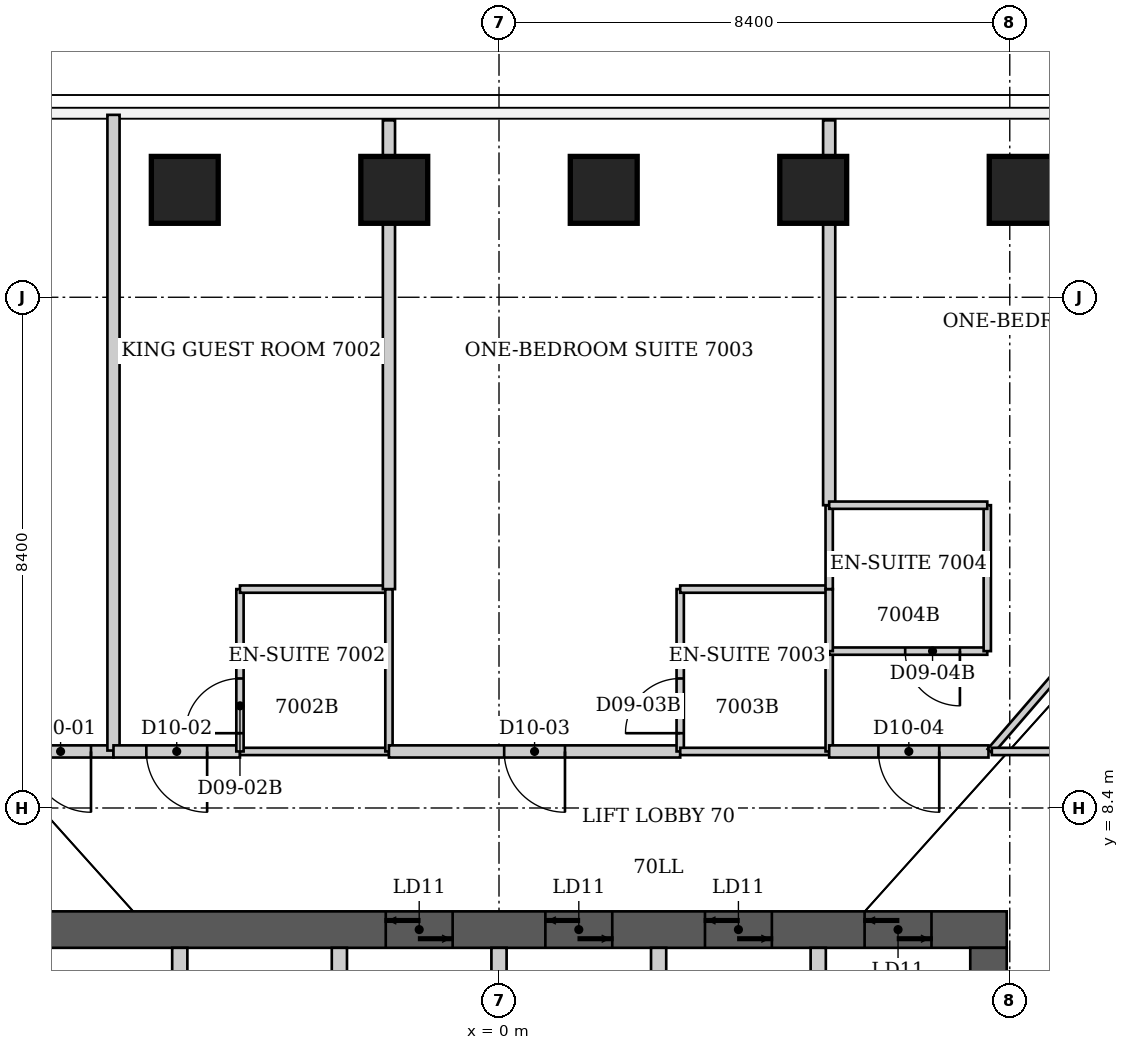
"""IFC4 building model, lengths in metres.
Left out: names, types, materials, properties, quantities, classifications, styles, units other than length and angle.
Written with IfcOpenShell. Run it as: python <this file> out.ifc"""

import sys

from ifc_helpers import new_model, si_unit, direction, frame, frame_2d, origin, origin_2d, place, context, subcontext, project, spatial, rectangle, extrude, element, fill, save


model = new_model("IFC4")
c1 = context("Model", 3, precision=1e-05, world=origin(), true_north=direction((0.0, 1.0)))
c2 = subcontext(c1, "Body", "Model", "MODEL_VIEW")
j1 = project(units=[si_unit("LENGTHUNIT", "METRE"), si_unit("PLANEANGLEUNIT", "RADIAN")], contexts=[c1])
p1 = place(None, origin())
s1 = spatial("IfcSite", under=j1, at=p1, CompositionType="ELEMENT")
p2 = place(p1, origin())
s2 = spatial("IfcBuilding", under=s1, at=p2, CompositionType="ELEMENT")
p3 = place(p2, frame((0.0, 0.0, 279.8)))
s3 = spatial("IfcBuildingStorey", under=s2, at=p3, CompositionType="ELEMENT", Elevation=279.8)
for number, where, z_axis, x_axis in (
    (1, (-5.167, 18.566, 0.0), (0.0, 0.0, 1.0), (0.0, 1.0, 0.0)),
    (2, (-1.722, 18.566, 0.0), (0.0, 0.0, 1.0), (0.0, 1.0, 0.0)),
    (3, (1.722, 18.566, 0.0), (0.0, 0.0, 1.0), (0.0, 1.0, 0.0)),
    (4, (5.167, 18.566, 0.0), (0.0, 0.0, 1.0), (0.0, 1.0, 0.0)),
    (5, (8.613, 18.566, 0.0), (0.0, 0.0, 1.0), (0.0, 1.0, 0.0)),
):
    element("IfcColumn", number, at=place(p3, frame(where, z_axis=z_axis, x_axis=x_axis)), inside=s3, PredefinedType="COLUMN", context=c2, shape_type="SweptSolid", body=[
        extrude(rectangle(XDim=1.1, YDim=1.1, at=origin_2d()), origin(), (0.0, 0.0, 1.0), 3.8),
    ])
p4 = place(p3, frame((-8.35, 6.4, 0.0), z_axis=(0.0, 0.0, 1.0), x_axis=(1.0, 0.0, 0.0)))
e6 = element("IfcWall", 6, at=p4, inside=s3, PredefinedType="SHEAR", context=c2, shape_type="SweptSolid", body=[
    extrude(rectangle(XDim=16.7, YDim=0.6, at=frame_2d((8.35, 0.0))), origin(), (0.0, 0.0, 1.0), 3.8),
])
p5 = place(p4, frame((6.488, 0.0, 0.0)))
e7 = element("IfcOpeningElement", 7, at=p5, cuts=e6, PredefinedType="OPENING", context=c2, shape_type="SweptSolid", body=[
    extrude(rectangle(XDim=1.1, YDim=2.1, at=frame_2d((0.55, 1.05))), frame((0.0, 0.3, 0.0), z_axis=(0.0, -1.0, 0.0), x_axis=(1.0, 0.0, 0.0)), (0.0, 0.0, 1.0), 0.6),
])
p6 = place(p4, frame((9.113, 0.0, 0.0)))
e8 = element("IfcOpeningElement", 8, at=p6, cuts=e6, PredefinedType="OPENING", context=c2, shape_type="SweptSolid", body=[
    extrude(rectangle(XDim=1.1, YDim=2.1, at=frame_2d((0.55, 1.05))), frame((0.0, 0.3, 0.0), z_axis=(0.0, -1.0, 0.0), x_axis=(1.0, 0.0, 0.0)), (0.0, 0.0, 1.0), 0.6),
])
p7 = place(p4, frame((11.738, 0.0, 0.0)))
e9 = element("IfcOpeningElement", 9, at=p7, cuts=e6, PredefinedType="OPENING", context=c2, shape_type="SweptSolid", body=[
    extrude(rectangle(XDim=1.1, YDim=2.1, at=frame_2d((0.55, 1.05))), frame((0.0, 0.3, 0.0), z_axis=(0.0, -1.0, 0.0), x_axis=(1.0, 0.0, 0.0)), (0.0, 0.0, 1.0), 0.6),
])
p8 = place(p4, frame((14.363, 0.0, 0.0)))
e10 = element("IfcOpeningElement", 10, at=p8, cuts=e6, PredefinedType="OPENING", context=c2, shape_type="SweptSolid", body=[
    extrude(rectangle(XDim=1.1, YDim=2.1, at=frame_2d((0.55, 1.05))), frame((0.0, 0.3, 0.0), z_axis=(0.0, -1.0, 0.0), x_axis=(1.0, 0.0, 0.0)), (0.0, 0.0, 1.0), 0.6),
])
p9 = place(p3, frame((8.05, -6.1, 0.0), z_axis=(0.0, 0.0, 1.0), x_axis=(0.0, 1.0, 0.0)))
e11 = element("IfcWall", 11, at=p9, inside=s3, PredefinedType="SHEAR", context=c2, shape_type="SweptSolid", body=[
    extrude(rectangle(XDim=12.2, YDim=0.6, at=frame_2d((6.1, 0.0))), origin(), (0.0, 0.0, 1.0), 3.8),
])
p10 = place(p9, frame((7.6, 0.0, 0.0)))
e12 = element("IfcOpeningElement", 12, at=p10, cuts=e11, PredefinedType="OPENING", context=c2, shape_type="SweptSolid", body=[
    extrude(rectangle(XDim=1.2, YDim=2.2, at=frame_2d((0.6, 1.1))), frame((0.0, 0.3, 0.0), z_axis=(0.0, -1.0, 0.0), x_axis=(1.0, 0.0, 0.0)), (0.0, 0.0, 1.0), 0.6),
])
for number, where, z_axis, x_axis in (
    (13, (-5.25, 3.35, 0.0), (0.0, 0.0, 1.0), (0.0, 1.0, 0.0)),
    (14, (-2.625, 3.35, 0.0), (0.0, 0.0, 1.0), (0.0, 1.0, 0.0)),
    (15, (0.0, 3.35, 0.0), (0.0, 0.0, 1.0), (0.0, 1.0, 0.0)),
    (16, (2.625, 3.35, 0.0), (0.0, 0.0, 1.0), (0.0, 1.0, 0.0)),
    (17, (5.25, 3.35, 0.0), (0.0, 0.0, 1.0), (0.0, 1.0, 0.0)),
):
    element("IfcWall", number, at=place(p3, frame(where, z_axis=z_axis, x_axis=x_axis)), inside=s3, PredefinedType="PARTITIONING", context=c2, shape_type="SweptSolid", body=[
        extrude(rectangle(XDim=2.75, YDim=0.25, at=frame_2d((1.375, 0.0))), origin(), (0.0, 0.0, 1.0), 3.8),
    ])
p11 = place(p3, frame((-6.34, 9.33, 0.0), z_axis=(0.0, 0.0, 1.0), x_axis=(-1.0, 0.0, 0.0)))
e18 = element("IfcWall", 18, at=p11, inside=s3, PredefinedType="PARTITIONING", context=c2, shape_type="SweptSolid", body=[
    extrude(rectangle(XDim=1.74, YDim=0.2, at=frame_2d((0.87, 0.0))), origin(), (0.0, 0.0, 1.0), 3.64),
])
p12 = place(p11, frame((0.37, 0.0, 0.0)))
e19 = element("IfcOpeningElement", 19, at=p12, cuts=e18, PredefinedType="OPENING", context=c2, shape_type="SweptSolid", body=[
    extrude(rectangle(XDim=1.0, YDim=2.13, at=frame_2d((0.5, 1.065))), frame((0.0, 0.1, 0.0), z_axis=(0.0, -1.0, 0.0), x_axis=(1.0, 0.0, 0.0)), (0.0, 0.0, 1.0), 0.2),
])
p13 = place(p3, frame((-6.34, 19.8, 0.0), z_axis=(0.0, 0.0, 1.0), x_axis=(0.0, -1.0, 0.0)))
e20 = element("IfcWall", 20, at=p13, inside=s3, PredefinedType="PARTITIONING", context=c2, shape_type="SweptSolid", body=[
    extrude(rectangle(XDim=10.455, YDim=0.2, at=frame_2d((5.228, 0.0))), origin(), (0.0, 0.0, 1.0), 3.64),
])
p14 = place(p3, frame((-4.26, 9.33, 0.0), z_axis=(0.0, 0.0, 1.0), x_axis=(-1.0, 0.0, 0.0)))
e21 = element("IfcWall", 21, at=p14, inside=s3, PredefinedType="PARTITIONING", context=c2, shape_type="SweptSolid", body=[
    extrude(rectangle(XDim=2.08, YDim=0.2, at=frame_2d((1.04, 0.0))), origin(), (0.0, 0.0, 1.0), 3.64),
])
p15 = place(p14, frame((0.54, 0.0, 0.0)))
e22 = element("IfcOpeningElement", 22, at=p15, cuts=e21, PredefinedType="OPENING", context=c2, shape_type="SweptSolid", body=[
    extrude(rectangle(XDim=1.0, YDim=2.13, at=frame_2d((0.5, 1.065))), frame((0.0, 0.1, 0.0), z_axis=(0.0, -1.0, 0.0), x_axis=(1.0, 0.0, 0.0)), (0.0, 0.0, 1.0), 0.2),
])
p16 = place(p3, frame((-4.26, 9.33, 0.0), z_axis=(0.0, 0.0, 1.0), x_axis=(1.0, 0.0, 0.0)))
e23 = element("IfcWall", 23, at=p16, inside=s3, PredefinedType="PARTITIONING", context=c2, shape_type="SweptSolid", body=[
    extrude(rectangle(XDim=2.45, YDim=0.12, at=frame_2d((1.225, 0.0))), origin(), (0.0, 0.0, 1.0), 3.64),
])
p17 = place(p3, frame((-4.26, 12.0, 0.0), z_axis=(0.0, 0.0, 1.0), x_axis=(0.0, -1.0, 0.0)))
e24 = element("IfcWall", 24, at=p17, inside=s3, PredefinedType="PARTITIONING", context=c2, shape_type="SweptSolid", body=[
    extrude(rectangle(XDim=2.67, YDim=0.12, at=frame_2d((1.335, 0.0))), origin(), (0.0, 0.0, 1.0), 3.64),
])
p18 = place(p17, frame((1.47, 0.0, 0.0)))
e25 = element("IfcOpeningElement", 25, at=p18, cuts=e24, PredefinedType="OPENING", context=c2, shape_type="SweptSolid", body=[
    extrude(rectangle(XDim=0.9, YDim=2.03, at=frame_2d((0.45, 1.015))), frame((0.0, 0.06, 0.0), z_axis=(0.0, -1.0, 0.0), x_axis=(1.0, 0.0, 0.0)), (0.0, 0.0, 1.0), 0.12),
])
p19 = place(p3, frame((-1.81, 12.0, 0.0), z_axis=(0.0, 0.0, 1.0), x_axis=(-1.0, 0.0, 0.0)))
e26 = element("IfcWall", 26, at=p19, inside=s3, PredefinedType="PARTITIONING", context=c2, shape_type="SweptSolid", body=[
    extrude(rectangle(XDim=2.45, YDim=0.12, at=frame_2d((1.225, 0.0))), origin(), (0.0, 0.0, 1.0), 3.64),
])
p20 = place(p3, frame((-1.81, 12.0, 0.0), z_axis=(0.0, 0.0, 1.0), x_axis=(0.0, -1.0, 0.0)))
e27 = element("IfcWall", 27, at=p20, inside=s3, PredefinedType="PARTITIONING", context=c2, shape_type="SweptSolid", body=[
    extrude(rectangle(XDim=2.67, YDim=0.12, at=frame_2d((1.335, 0.0))), origin(), (0.0, 0.0, 1.0), 3.023),
])
p21 = place(p3, frame((-1.81, 19.71, 0.0), z_axis=(0.0, 0.0, 1.0), x_axis=(0.0, -1.0, 0.0)))
e28 = element("IfcWall", 28, at=p21, inside=s3, PredefinedType="PARTITIONING", context=c2, shape_type="SweptSolid", body=[
    extrude(rectangle(XDim=7.71, YDim=0.2, at=frame_2d((3.855, 0.0))), origin(), (0.0, 0.0, 1.0), 3.023),
])
p22 = place(p3, frame((2.98, 9.33, 0.0), z_axis=(0.0, 0.0, 1.0), x_axis=(-1.0, 0.0, 0.0)))
e29 = element("IfcWall", 29, at=p22, inside=s3, PredefinedType="PARTITIONING", context=c2, shape_type="SweptSolid", body=[
    extrude(rectangle(XDim=4.79, YDim=0.2, at=frame_2d((2.395, 0.0))), origin(), (0.0, 0.0, 1.0), 3.64),
])
p23 = place(p22, frame((1.895, 0.0, 0.0)))
e30 = element("IfcOpeningElement", 30, at=p23, cuts=e29, PredefinedType="OPENING", context=c2, shape_type="SweptSolid", body=[
    extrude(rectangle(XDim=1.0, YDim=2.13, at=frame_2d((0.5, 1.065))), frame((0.0, 0.1, 0.0), z_axis=(0.0, -1.0, 0.0), x_axis=(1.0, 0.0, 0.0)), (0.0, 0.0, 1.0), 0.2),
])
p24 = place(p3, frame((2.98, 12.0, 0.0), z_axis=(0.0, 0.0, 1.0), x_axis=(0.0, -1.0, 0.0)))
e31 = element("IfcWall", 31, at=p24, inside=s3, PredefinedType="PARTITIONING", context=c2, shape_type="SweptSolid", body=[
    extrude(rectangle(XDim=2.67, YDim=0.12, at=frame_2d((1.335, 0.0))), origin(), (0.0, 0.0, 1.0), 3.64),
])
p25 = place(p24, frame((1.47, 0.0, 0.0)))
e32 = element("IfcOpeningElement", 32, at=p25, cuts=e31, PredefinedType="OPENING", context=c2, shape_type="SweptSolid", body=[
    extrude(rectangle(XDim=0.9, YDim=2.03, at=frame_2d((0.45, 1.015))), frame((0.0, 0.06, 0.0), z_axis=(0.0, -1.0, 0.0), x_axis=(1.0, 0.0, 0.0)), (0.0, 0.0, 1.0), 0.12),
])
p26 = place(p3, frame((5.43, 9.33, 0.0), z_axis=(0.0, 0.0, 1.0), x_axis=(-1.0, 0.0, 0.0)))
e33 = element("IfcWall", 33, at=p26, inside=s3, PredefinedType="PARTITIONING", context=c2, shape_type="SweptSolid", body=[
    extrude(rectangle(XDim=2.45, YDim=0.12, at=frame_2d((1.225, 0.0))), origin(), (0.0, 0.0, 1.0), 3.64),
])
p27 = place(p3, frame((5.43, 10.98, 0.0), z_axis=(0.0, 0.0, 1.0), x_axis=(0.0, -1.0, 0.0)))
e34 = element("IfcWall", 34, at=p27, inside=s3, PredefinedType="PARTITIONING", context=c2, shape_type="SweptSolid", body=[
    extrude(rectangle(XDim=1.65, YDim=0.12, at=frame_2d((0.825, 0.0))), origin(), (0.0, 0.0, 1.0), 3.64),
])
p28 = place(p3, frame((5.43, 10.98, 0.0), z_axis=(0.0, 0.0, 1.0), x_axis=(1.0, 0.0, 0.0)))
e35 = element("IfcWall", 35, at=p28, inside=s3, PredefinedType="PARTITIONING", context=c2, shape_type="SweptSolid", body=[
    extrude(rectangle(XDim=2.6, YDim=0.12, at=frame_2d((1.3, 0.0))), origin(), (0.0, 0.0, 1.0), 3.64),
])
p29 = place(p28, frame((1.25, 0.0, 0.0)))
e36 = element("IfcOpeningElement", 36, at=p29, cuts=e35, PredefinedType="OPENING", context=c2, shape_type="SweptSolid", body=[
    extrude(rectangle(XDim=0.9, YDim=2.03, at=frame_2d((0.45, 1.015))), frame((0.0, 0.06, 0.0), z_axis=(0.0, -1.0, 0.0), x_axis=(1.0, 0.0, 0.0)), (0.0, 0.0, 1.0), 0.12),
])
p30 = place(p3, frame((5.43, 12.0, 0.0), z_axis=(0.0, 0.0, 1.0), x_axis=(-1.0, 0.0, 0.0)))
e37 = element("IfcWall", 37, at=p30, inside=s3, PredefinedType="PARTITIONING", context=c2, shape_type="SweptSolid", body=[
    extrude(rectangle(XDim=2.45, YDim=0.12, at=frame_2d((1.225, 0.0))), origin(), (0.0, 0.0, 1.0), 3.64),
])
p31 = place(p3, frame((5.43, 12.0, 0.0), z_axis=(0.0, 0.0, 1.0), x_axis=(0.0, -1.0, 0.0)))
e38 = element("IfcWall", 38, at=p31, inside=s3, PredefinedType="PARTITIONING", context=c2, shape_type="SweptSolid", body=[
    extrude(rectangle(XDim=1.02, YDim=0.12, at=frame_2d((0.51, 0.0))), origin(), (0.0, 0.0, 1.0), 3.64),
])
p32 = place(p3, frame((5.43, 13.38, 0.0), z_axis=(0.0, 0.0, 1.0), x_axis=(0.0, -1.0, 0.0)))
e39 = element("IfcWall", 39, at=p32, inside=s3, PredefinedType="PARTITIONING", context=c2, shape_type="SweptSolid", body=[
    extrude(rectangle(XDim=1.38, YDim=0.12, at=frame_2d((0.69, 0.0))), origin(), (0.0, 0.0, 1.0), 3.64),
])
p33 = place(p3, frame((5.43, 19.71, 0.0), z_axis=(0.0, 0.0, 1.0), x_axis=(0.0, -1.0, 0.0)))
e40 = element("IfcWall", 40, at=p33, inside=s3, PredefinedType="PARTITIONING", context=c2, shape_type="SweptSolid", body=[
    extrude(rectangle(XDim=6.33, YDim=0.2, at=frame_2d((3.165, 0.0))), origin(), (0.0, 0.0, 1.0), 3.64),
])
p34 = place(p3, frame((8.03, 10.98, 0.0), z_axis=(0.0, 0.0, 1.0), x_axis=(0.0, 1.0, 0.0)))
e41 = element("IfcWall", 41, at=p34, inside=s3, PredefinedType="PARTITIONING", context=c2, shape_type="SweptSolid", body=[
    extrude(rectangle(XDim=2.4, YDim=0.12, at=frame_2d((1.2, 0.0))), origin(), (0.0, 0.0, 1.0), 3.64),
])
p35 = place(p3, frame((8.03, 13.38, 0.0), z_axis=(0.0, 0.0, 1.0), x_axis=(-1.0, 0.0, 0.0)))
e42 = element("IfcWall", 42, at=p35, inside=s3, PredefinedType="PARTITIONING", context=c2, shape_type="SweptSolid", body=[
    extrude(rectangle(XDim=2.6, YDim=0.12, at=frame_2d((1.3, 0.0))), origin(), (0.0, 0.0, 1.0), 3.64),
])
p36 = place(p3, frame((8.05, 9.33, 0.0), z_axis=(0.0, 0.0, 1.0), x_axis=(-1.0, 0.0, 0.0)))
e43 = element("IfcWall", 43, at=p36, inside=s3, PredefinedType="PARTITIONING", context=c2, shape_type="SweptSolid", body=[
    extrude(rectangle(XDim=2.62, YDim=0.2, at=frame_2d((1.31, 0.0))), origin(), (0.0, 0.0, 1.0), 3.64),
])
p37 = place(p36, frame((0.81, 0.0, 0.0)))
e44 = element("IfcOpeningElement", 44, at=p37, cuts=e43, PredefinedType="OPENING", context=c2, shape_type="SweptSolid", body=[
    extrude(rectangle(XDim=1.0, YDim=2.13, at=frame_2d((0.5, 1.065))), frame((0.0, 0.1, 0.0), z_axis=(0.0, -1.0, 0.0), x_axis=(1.0, 0.0, 0.0)), (0.0, 0.0, 1.0), 0.2),
])
p38 = place(p3, frame((8.08, 9.33, 0.0), z_axis=(0.0, 0.0, 1.0), x_axis=(0.653839376009, 0.756633379108, 0.0)))
e45 = element("IfcWall", 45, at=p38, inside=s3, PredefinedType="PARTITIONING", context=c2, shape_type="SweptSolid", body=[
    extrude(rectangle(XDim=3.793, YDim=0.12, at=frame_2d((1.896, 0.0))), origin(), (0.0, 0.0, 1.0), 3.64),
])
p39 = place(p3, frame((10.04, 9.33, 0.0), z_axis=(0.0, 0.0, 1.0), x_axis=(-1.0, 0.0, 0.0)))
e46 = element("IfcWall", 46, at=p39, inside=s3, PredefinedType="PARTITIONING", context=c2, shape_type="SweptSolid", body=[
    extrude(rectangle(XDim=1.935, YDim=0.12, at=frame_2d((0.968, 0.0))), origin(), (0.0, 0.0, 1.0), 3.64),
])
p40 = place(p12, origin())
e47 = element("IfcDoor", 47, at=p40, inside=s3, OperationType="SINGLE_SWING_LEFT", PredefinedType="DOOR", context=c2, shape_type="SweptSolid", body=[
    extrude(rectangle(XDim=1.0, YDim=2.13, at=frame_2d((0.5, 1.065))), frame((0.0, 0.025, 0.0), z_axis=(0.0, -1.0, 0.0), x_axis=(1.0, 0.0, 0.0)), (0.0, 0.0, 1.0), 0.05),
])
fill(e19, e47)
p41 = place(p15, origin())
e48 = element("IfcDoor", 48, at=p41, inside=s3, OperationType="SINGLE_SWING_LEFT", PredefinedType="DOOR", context=c2, shape_type="SweptSolid", body=[
    extrude(rectangle(XDim=1.0, YDim=2.13, at=frame_2d((0.5, 1.065))), frame((0.0, 0.025, 0.0), z_axis=(0.0, -1.0, 0.0), x_axis=(1.0, 0.0, 0.0)), (0.0, 0.0, 1.0), 0.05),
])
fill(e22, e48)
p42 = place(p18, origin())
e49 = element("IfcDoor", 49, at=p42, inside=s3, OperationType="SINGLE_SWING_RIGHT", PredefinedType="DOOR", context=c2, shape_type="SweptSolid", body=[
    extrude(rectangle(XDim=0.9, YDim=2.03, at=frame_2d((0.45, 1.015))), frame((0.0, 0.025, 0.0), z_axis=(0.0, -1.0, 0.0), x_axis=(1.0, 0.0, 0.0)), (0.0, 0.0, 1.0), 0.05),
])
fill(e25, e49)
p43 = place(p23, origin())
e50 = element("IfcDoor", 50, at=p43, inside=s3, OperationType="SINGLE_SWING_LEFT", PredefinedType="DOOR", context=c2, shape_type="SweptSolid", body=[
    extrude(rectangle(XDim=1.0, YDim=2.13, at=frame_2d((0.5, 1.065))), frame((0.0, 0.025, 0.0), z_axis=(0.0, -1.0, 0.0), x_axis=(1.0, 0.0, 0.0)), (0.0, 0.0, 1.0), 0.05),
])
fill(e30, e50)
p44 = place(p25, origin())
e51 = element("IfcDoor", 51, at=p44, inside=s3, OperationType="SINGLE_SWING_RIGHT", PredefinedType="DOOR", context=c2, shape_type="SweptSolid", body=[
    extrude(rectangle(XDim=0.9, YDim=2.03, at=frame_2d((0.45, 1.015))), frame((0.0, 0.025, 0.0), z_axis=(0.0, -1.0, 0.0), x_axis=(1.0, 0.0, 0.0)), (0.0, 0.0, 1.0), 0.05),
])
fill(e32, e51)
p45 = place(p37, origin())
e52 = element("IfcDoor", 52, at=p45, inside=s3, OperationType="SINGLE_SWING_LEFT", PredefinedType="DOOR", context=c2, shape_type="SweptSolid", body=[
    extrude(rectangle(XDim=1.0, YDim=2.13, at=frame_2d((0.5, 1.065))), frame((0.0, 0.025, 0.0), z_axis=(0.0, -1.0, 0.0), x_axis=(1.0, 0.0, 0.0)), (0.0, 0.0, 1.0), 0.05),
])
fill(e44, e52)
p46 = place(p29, origin())
e53 = element("IfcDoor", 53, at=p46, inside=s3, OperationType="SINGLE_SWING_RIGHT", PredefinedType="DOOR", context=c2, shape_type="SweptSolid", body=[
    extrude(rectangle(XDim=0.9, YDim=2.03, at=frame_2d((0.45, 1.015))), frame((0.0, 0.025, 0.0), z_axis=(0.0, -1.0, 0.0), x_axis=(1.0, 0.0, 0.0)), (0.0, 0.0, 1.0), 0.05),
])
fill(e36, e53)
p47 = place(p5, origin())
e54 = element("IfcDoor", 54, at=p47, inside=s3, OperationType="DOUBLE_DOOR_SLIDING", PredefinedType="DOOR", context=c2, shape_type="SweptSolid", body=[
    extrude(rectangle(XDim=1.1, YDim=2.1, at=frame_2d((0.55, 1.05))), frame((0.0, 0.025, 0.0), z_axis=(0.0, -1.0, 0.0), x_axis=(1.0, 0.0, 0.0)), (0.0, 0.0, 1.0), 0.05),
])
fill(e7, e54)
p48 = place(p6, origin())
e55 = element("IfcDoor", 55, at=p48, inside=s3, OperationType="DOUBLE_DOOR_SLIDING", PredefinedType="DOOR", context=c2, shape_type="SweptSolid", body=[
    extrude(rectangle(XDim=1.1, YDim=2.1, at=frame_2d((0.55, 1.05))), frame((0.0, 0.025, 0.0), z_axis=(0.0, -1.0, 0.0), x_axis=(1.0, 0.0, 0.0)), (0.0, 0.0, 1.0), 0.05),
])
fill(e8, e55)
p49 = place(p7, origin())
e56 = element("IfcDoor", 56, at=p49, inside=s3, OperationType="DOUBLE_DOOR_SLIDING", PredefinedType="DOOR", context=c2, shape_type="SweptSolid", body=[
    extrude(rectangle(XDim=1.1, YDim=2.1, at=frame_2d((0.55, 1.05))), frame((0.0, 0.025, 0.0), z_axis=(0.0, -1.0, 0.0), x_axis=(1.0, 0.0, 0.0)), (0.0, 0.0, 1.0), 0.05),
])
fill(e9, e56)
p50 = place(p8, origin())
e57 = element("IfcDoor", 57, at=p50, inside=s3, OperationType="DOUBLE_DOOR_SLIDING", PredefinedType="DOOR", context=c2, shape_type="SweptSolid", body=[
    extrude(rectangle(XDim=1.1, YDim=2.1, at=frame_2d((0.55, 1.05))), frame((0.0, 0.025, 0.0), z_axis=(0.0, -1.0, 0.0), x_axis=(1.0, 0.0, 0.0)), (0.0, 0.0, 1.0), 0.05),
])
fill(e10, e57)
save(model, sys.argv[1])
